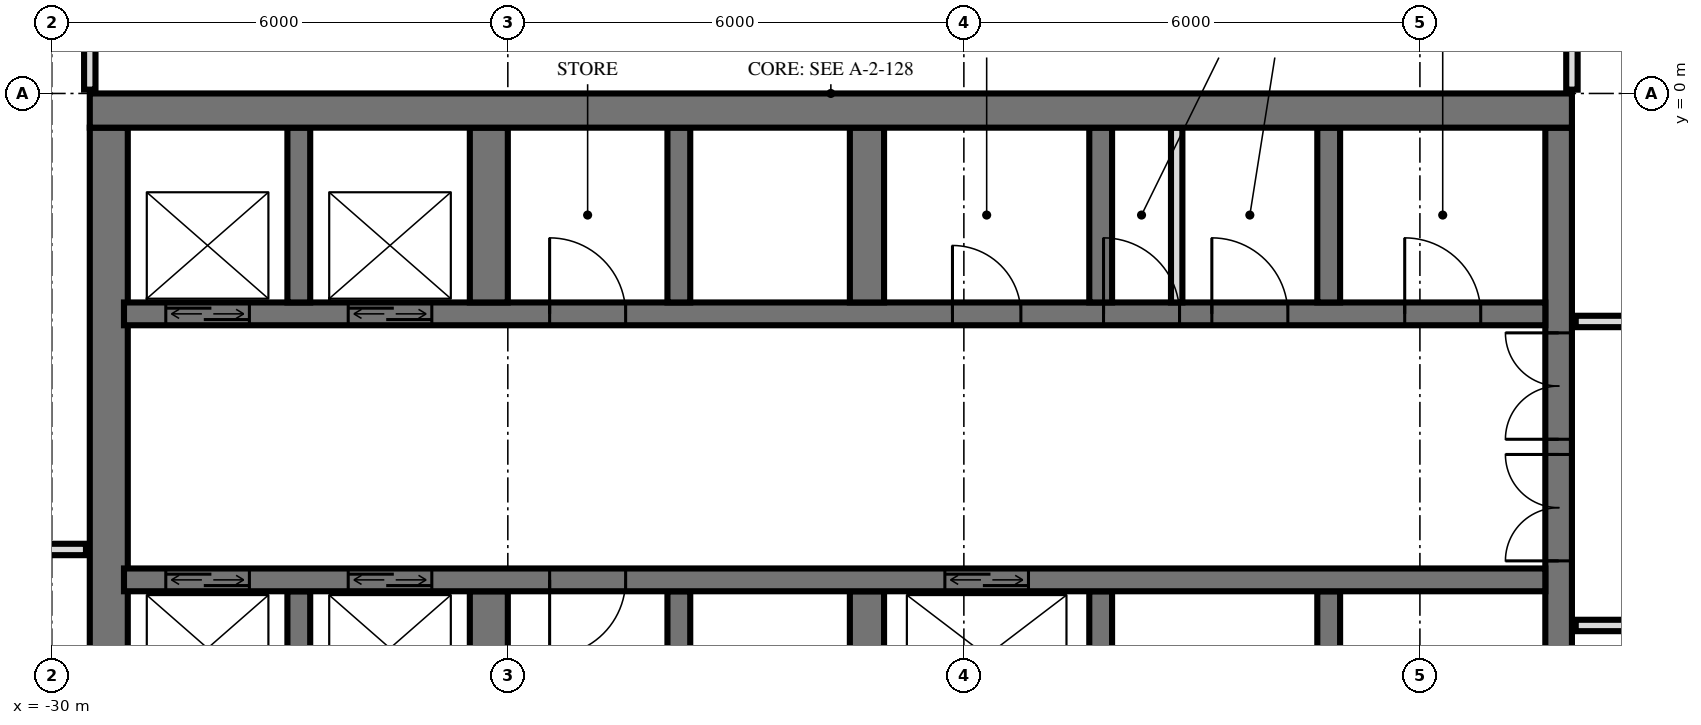
"""IFC4 building model, lengths in metres.
Left out: names, types, materials, properties, quantities, classifications, styles, units other than length and angle.
Written with IfcOpenShell. Run it as: python <this file> out.ifc"""

import sys

from ifc_helpers import new_model, si_unit, direction, frame, frame_2d, origin, place, context, subcontext, project, spatial, rectangle, extrude, element, fill, save


model = new_model("IFC4")
c1 = context("Model", 3, precision=1e-05, world=origin(), true_north=direction((0.0, 1.0)))
c2 = subcontext(c1, "Body", "Model", "MODEL_VIEW")
j1 = project(units=[si_unit("LENGTHUNIT", "METRE"), si_unit("PLANEANGLEUNIT", "RADIAN")], contexts=[c1])
p1 = place(None, origin())
s1 = spatial("IfcSite", under=j1, at=p1, CompositionType="ELEMENT")
p2 = place(p1, origin())
s2 = spatial("IfcBuilding", under=s1, at=p2, CompositionType="ELEMENT")
p3 = place(p2, frame((0.0, 0.0, 45.6)))
s3 = spatial("IfcBuildingStorey", under=s2, at=p3, CompositionType="ELEMENT", Elevation=45.6)
p4 = place(p3, frame((-29.5, -0.225, 0.0), z_axis=(0.0, 0.0, 1.0), x_axis=(1.0, 0.0, 0.0)))
e1 = element("IfcWall", 1, at=p4, inside=s3, PredefinedType="SHEAR", context=c2, shape_type="SweptSolid", body=[
    extrude(rectangle(XDim=19.5, YDim=0.45, at=frame_2d((9.75, 0.0))), origin(), (0.0, 0.0, 1.0), 3.6),
])
p5 = place(p3, frame((-10.175, -14.55, 0.0), z_axis=(0.0, 0.0, 1.0), x_axis=(0.0, 1.0, 0.0)))
e2 = element("IfcWall", 2, at=p5, inside=s3, PredefinedType="SHEAR", context=c2, shape_type="SweptSolid", body=[
    extrude(rectangle(XDim=14.1, YDim=0.35, at=frame_2d((7.05, 0.0))), origin(), (0.0, 0.0, 1.0), 3.6),
])
p6 = place(p5, frame((8.4, 0.0, 0.0)))
e3 = element("IfcOpeningElement", 3, at=p6, cuts=e2, PredefinedType="OPENING", context=c2, shape_type="SweptSolid", body=[
    extrude(rectangle(XDim=1.4, YDim=2.4, at=frame_2d((0.7, 1.2))), frame((0.0, 0.185, 0.0), z_axis=(0.0, -1.0, 0.0), x_axis=(1.0, 0.0, 0.0)), (0.0, 0.0, 1.0), 0.37),
])
p7 = place(p5, frame((10.0, 0.0, 0.0)))
e4 = element("IfcOpeningElement", 4, at=p7, cuts=e2, PredefinedType="OPENING", context=c2, shape_type="SweptSolid", body=[
    extrude(rectangle(XDim=1.4, YDim=2.4, at=frame_2d((0.7, 1.2))), frame((0.0, 0.185, 0.0), z_axis=(0.0, -1.0, 0.0), x_axis=(1.0, 0.0, 0.0)), (0.0, 0.0, 1.0), 0.37),
])
p8 = place(p5, frame((4.0, 0.0, 0.0)))
e5 = element("IfcOpeningElement", 5, at=p8, cuts=e2, PredefinedType="OPENING", context=c2, shape_type="SweptSolid", body=[
    extrude(rectangle(XDim=1.2, YDim=2.1, at=frame_2d((0.6, 1.05))), frame((0.0, 0.185, 0.0), z_axis=(0.0, -1.0, 0.0), x_axis=(1.0, 0.0, 0.0)), (0.0, 0.0, 1.0), 0.37),
])
p9 = place(p3, frame((-29.25, -14.55, 0.0), z_axis=(0.0, 0.0, 1.0), x_axis=(0.0, 1.0, 0.0)))
e6 = element("IfcWall", 6, at=p9, inside=s3, PredefinedType="SHEAR", context=c2, shape_type="SweptSolid", body=[
    extrude(rectangle(XDim=14.1, YDim=0.5, at=frame_2d((7.05, 0.0))), origin(), (0.0, 0.0, 1.0), 3.6),
])
p10 = place(p3, frame((-29.05, -2.9, 0.0), z_axis=(0.0, 0.0, 1.0), x_axis=(1.0, 0.0, 0.0)))
e7 = element("IfcWall", 7, at=p10, inside=s3, PredefinedType="SHEAR", context=c2, shape_type="SweptSolid", body=[
    extrude(rectangle(XDim=18.7, YDim=0.3, at=frame_2d((9.35, 0.0))), origin(), (0.0, 0.0, 1.0), 3.6),
])
p11 = place(p10, frame((2.95, 0.0, 0.0)))
e8 = element("IfcOpeningElement", 8, at=p11, cuts=e7, PredefinedType="OPENING", context=c2, shape_type="SweptSolid", body=[
    extrude(rectangle(XDim=1.1, YDim=2.1, at=frame_2d((0.55, 1.05))), frame((0.0, 0.16, 0.0), z_axis=(0.0, -1.0, 0.0), x_axis=(1.0, 0.0, 0.0)), (0.0, 0.0, 1.0), 0.32),
])
p12 = place(p10, frame((0.55, 0.0, 0.0)))
e9 = element("IfcOpeningElement", 9, at=p12, cuts=e7, PredefinedType="OPENING", context=c2, shape_type="SweptSolid", body=[
    extrude(rectangle(XDim=1.1, YDim=2.1, at=frame_2d((0.55, 1.05))), frame((0.0, 0.16, 0.0), z_axis=(0.0, -1.0, 0.0), x_axis=(1.0, 0.0, 0.0)), (0.0, 0.0, 1.0), 0.32),
])
p13 = place(p10, frame((10.9, 0.0, 0.0)))
e10 = element("IfcOpeningElement", 10, at=p13, cuts=e7, PredefinedType="OPENING", context=c2, shape_type="SweptSolid", body=[
    extrude(rectangle(XDim=0.9, YDim=2.1, at=frame_2d((0.45, 1.05))), frame((0.0, 0.16, 0.0), z_axis=(0.0, -1.0, 0.0), x_axis=(1.0, 0.0, 0.0)), (0.0, 0.0, 1.0), 0.32),
])
p14 = place(p10, frame((16.85, 0.0, 0.0)))
e11 = element("IfcOpeningElement", 11, at=p14, cuts=e7, PredefinedType="OPENING", context=c2, shape_type="SweptSolid", body=[
    extrude(rectangle(XDim=1.0, YDim=2.1, at=frame_2d((0.5, 1.05))), frame((0.0, 0.16, 0.0), z_axis=(0.0, -1.0, 0.0), x_axis=(1.0, 0.0, 0.0)), (0.0, 0.0, 1.0), 0.32),
])
p15 = place(p10, frame((14.312, 0.0, 0.0)))
e12 = element("IfcOpeningElement", 12, at=p15, cuts=e7, PredefinedType="OPENING", context=c2, shape_type="SweptSolid", body=[
    extrude(rectangle(XDim=1.0, YDim=2.1, at=frame_2d((0.5, 1.05))), frame((0.0, 0.16, 0.0), z_axis=(0.0, -1.0, 0.0), x_axis=(1.0, 0.0, 0.0)), (0.0, 0.0, 1.0), 0.32),
])
p16 = place(p10, frame((12.887, 0.0, 0.0)))
e13 = element("IfcOpeningElement", 13, at=p16, cuts=e7, PredefinedType="OPENING", context=c2, shape_type="SweptSolid", body=[
    extrude(rectangle(XDim=1.0, YDim=2.1, at=frame_2d((0.5, 1.05))), frame((0.0, 0.16, 0.0), z_axis=(0.0, -1.0, 0.0), x_axis=(1.0, 0.0, 0.0)), (0.0, 0.0, 1.0), 0.32),
])
p17 = place(p10, frame((5.6, 0.0, 0.0)))
e14 = element("IfcOpeningElement", 14, at=p17, cuts=e7, PredefinedType="OPENING", context=c2, shape_type="SweptSolid", body=[
    extrude(rectangle(XDim=1.0, YDim=2.1, at=frame_2d((0.5, 1.05))), frame((0.0, 0.16, 0.0), z_axis=(0.0, -1.0, 0.0), x_axis=(1.0, 0.0, 0.0)), (0.0, 0.0, 1.0), 0.32),
])
p18 = place(p3, frame((-29.05, -6.4, 0.0), z_axis=(0.0, 0.0, 1.0), x_axis=(1.0, 0.0, 0.0)))
e15 = element("IfcWall", 15, at=p18, inside=s3, PredefinedType="SHEAR", context=c2, shape_type="SweptSolid", body=[
    extrude(rectangle(XDim=18.7, YDim=0.3, at=frame_2d((9.35, 0.0))), origin(), (0.0, 0.0, 1.0), 3.6),
])
p19 = place(p18, frame((2.95, 0.0, 0.0)))
e16 = element("IfcOpeningElement", 16, at=p19, cuts=e15, PredefinedType="OPENING", context=c2, shape_type="SweptSolid", body=[
    extrude(rectangle(XDim=1.1, YDim=2.1, at=frame_2d((0.55, 1.05))), frame((0.0, 0.16, 0.0), z_axis=(0.0, -1.0, 0.0), x_axis=(1.0, 0.0, 0.0)), (0.0, 0.0, 1.0), 0.32),
])
p20 = place(p18, frame((0.55, 0.0, 0.0)))
e17 = element("IfcOpeningElement", 17, at=p20, cuts=e15, PredefinedType="OPENING", context=c2, shape_type="SweptSolid", body=[
    extrude(rectangle(XDim=1.1, YDim=2.1, at=frame_2d((0.55, 1.05))), frame((0.0, 0.16, 0.0), z_axis=(0.0, -1.0, 0.0), x_axis=(1.0, 0.0, 0.0)), (0.0, 0.0, 1.0), 0.32),
])
p21 = place(p18, frame((10.8, 0.0, 0.0)))
e18 = element("IfcOpeningElement", 18, at=p21, cuts=e15, PredefinedType="OPENING", context=c2, shape_type="SweptSolid", body=[
    extrude(rectangle(XDim=1.1, YDim=2.1, at=frame_2d((0.55, 1.05))), frame((0.0, 0.16, 0.0), z_axis=(0.0, -1.0, 0.0), x_axis=(1.0, 0.0, 0.0)), (0.0, 0.0, 1.0), 0.32),
])
p22 = place(p18, frame((5.6, 0.0, 0.0)))
e19 = element("IfcOpeningElement", 19, at=p22, cuts=e15, PredefinedType="OPENING", context=c2, shape_type="SweptSolid", body=[
    extrude(rectangle(XDim=1.0, YDim=2.1, at=frame_2d((0.5, 1.05))), frame((0.0, 0.16, 0.0), z_axis=(0.0, -1.0, 0.0), x_axis=(1.0, 0.0, 0.0)), (0.0, 0.0, 1.0), 0.32),
])
for number, where, z_axis, x_axis in (
    (20, (-13.2, -2.75, 0.0), (0.0, 0.0, 1.0), (0.0, 1.0, 0.0)),
    (21, (-13.2, -8.85, 0.0), (0.0, 0.0, 1.0), (0.0, 1.0, 0.0)),
    (22, (-16.2, -2.75, 0.0), (0.0, 0.0, 1.0), (0.0, 1.0, 0.0)),
    (23, (-16.2, -8.85, 0.0), (0.0, 0.0, 1.0), (0.0, 1.0, 0.0)),
):
    element("IfcWall", number, at=place(p3, frame(where, z_axis=z_axis, x_axis=x_axis)), inside=s3, PredefinedType="SHEAR", context=c2, shape_type="SweptSolid", body=[
        extrude(rectangle(XDim=2.3, YDim=0.3, at=frame_2d((1.15, 0.0))), origin(), (0.0, 0.0, 1.0), 3.6),
    ])
for number, where, z_axis, x_axis in (
    (24, (-19.275, -2.75, 0.0), (0.0, 0.0, 1.0), (0.0, 1.0, 0.0)),
    (25, (-19.275, -8.85, 0.0), (0.0, 0.0, 1.0), (0.0, 1.0, 0.0)),
):
    element("IfcWall", number, at=place(p3, frame(where, z_axis=z_axis, x_axis=x_axis)), inside=s3, PredefinedType="SHEAR", context=c2, shape_type="SweptSolid", body=[
        extrude(rectangle(XDim=2.3, YDim=0.45, at=frame_2d((1.15, 0.0))), origin(), (0.0, 0.0, 1.0), 3.6),
    ])
for number, where, z_axis, x_axis in (
    (26, (-21.75, -2.75, 0.0), (0.0, 0.0, 1.0), (0.0, 1.0, 0.0)),
    (27, (-21.75, -8.85, 0.0), (0.0, 0.0, 1.0), (0.0, 1.0, 0.0)),
):
    element("IfcWall", number, at=place(p3, frame(where, z_axis=z_axis, x_axis=x_axis)), inside=s3, PredefinedType="SHEAR", context=c2, shape_type="SweptSolid", body=[
        extrude(rectangle(XDim=2.3, YDim=0.3, at=frame_2d((1.15, 0.0))), origin(), (0.0, 0.0, 1.0), 3.6),
    ])
for number, where, z_axis, x_axis in (
    (28, (-24.25, -2.75, 0.0), (0.0, 0.0, 1.0), (0.0, 1.0, 0.0)),
    (29, (-24.25, -8.85, 0.0), (0.0, 0.0, 1.0), (0.0, 1.0, 0.0)),
):
    element("IfcWall", number, at=place(p3, frame(where, z_axis=z_axis, x_axis=x_axis)), inside=s3, PredefinedType="SHEAR", context=c2, shape_type="SweptSolid", body=[
        extrude(rectangle(XDim=2.3, YDim=0.5, at=frame_2d((1.15, 0.0))), origin(), (0.0, 0.0, 1.0), 3.6),
    ])
for number, where, z_axis, x_axis in (
    (30, (-26.75, -2.75, 0.0), (0.0, 0.0, 1.0), (0.0, 1.0, 0.0)),
    (31, (-26.75, -8.85, 0.0), (0.0, 0.0, 1.0), (0.0, 1.0, 0.0)),
):
    element("IfcWall", number, at=place(p3, frame(where, z_axis=z_axis, x_axis=x_axis)), inside=s3, PredefinedType="SHEAR", context=c2, shape_type="SweptSolid", body=[
        extrude(rectangle(XDim=2.3, YDim=0.3, at=frame_2d((1.15, 0.0))), origin(), (0.0, 0.0, 1.0), 3.6),
    ])
p23 = place(p3, frame((-15.2, -2.75, 0.0), z_axis=(0.0, 0.0, 1.0), x_axis=(0.0, 1.0, 0.0)))
e32 = element("IfcWall", 32, at=p23, inside=s3, PredefinedType="PARTITIONING", context=c2, shape_type="SweptSolid", body=[
    extrude(rectangle(XDim=2.3, YDim=0.15, at=frame_2d((1.15, 0.0))), origin(), (0.0, 0.0, 1.0), 3.3),
])
p24 = place(p3, frame((-10.0, 0.05, 0.0), z_axis=(0.0, 0.0, 1.0), x_axis=(0.0, 1.0, 0.0)))
e33 = element("IfcWall", 33, at=p24, inside=s3, PredefinedType="PARTITIONING", context=c2, shape_type="SweptSolid", body=[
    extrude(rectangle(XDim=0.97, YDim=0.15, at=frame_2d((0.485, 0.0))), origin(), (0.0, 0.0, 1.0), 3.32),
])
p25 = place(p3, frame((-29.5, 0.05, 0.0), z_axis=(0.0, 0.0, 1.0), x_axis=(0.0, 1.0, 0.0)))
e34 = element("IfcWall", 34, at=p25, inside=s3, PredefinedType="PARTITIONING", context=c2, shape_type="SweptSolid", body=[
    extrude(rectangle(XDim=0.827, YDim=0.15, at=frame_2d((0.414, 0.0))), origin(), (0.0, 0.0, 1.0), 3.32),
])
p26 = place(p3, frame((-9.95, -7.0, 0.0), z_axis=(0.0, 0.0, 1.0), x_axis=(1.0, 0.0, 0.0)))
e35 = element("IfcWall", 35, at=p26, inside=s3, PredefinedType="PARTITIONING", context=c2, shape_type="SweptSolid", body=[
    extrude(rectangle(XDim=19.9, YDim=0.15, at=frame_2d((9.95, 0.0))), origin(), (0.0, 0.0, 1.0), 3.32),
])
p27 = place(p26, frame((9.45, 0.0, 0.0)))
e36 = element("IfcOpeningElement", 36, at=p27, cuts=e35, PredefinedType="OPENING", context=c2, shape_type="SweptSolid", body=[
    extrude(rectangle(XDim=1.0, YDim=2.1, at=frame_2d((0.5, 1.05))), frame((0.0, 0.085, 0.0), z_axis=(0.0, -1.0, 0.0), x_axis=(1.0, 0.0, 0.0)), (0.0, 0.0, 1.0), 0.17),
])
p28 = place(p26, frame((3.45, 0.0, 0.0)))
e37 = element("IfcOpeningElement", 37, at=p28, cuts=e35, PredefinedType="OPENING", context=c2, shape_type="SweptSolid", body=[
    extrude(rectangle(XDim=1.0, YDim=2.1, at=frame_2d((0.5, 1.05))), frame((0.0, 0.085, 0.0), z_axis=(0.0, -1.0, 0.0), x_axis=(1.0, 0.0, 0.0)), (0.0, 0.0, 1.0), 0.17),
])
p29 = place(p3, frame((-33.12, -6.0, 0.0), z_axis=(0.0, 0.0, 1.0), x_axis=(1.0, 0.0, 0.0)))
e38 = element("IfcWall", 38, at=p29, inside=s3, PredefinedType="PLUMBINGWALL", context=c2, shape_type="SweptSolid", body=[
    extrude(rectangle(XDim=3.57, YDim=0.15, at=frame_2d((1.785, 0.0))), origin(), (0.0, 0.0, 1.0), 3.32),
])
p30 = place(p29, frame((1.27, 0.0, 0.0)))
e39 = element("IfcOpeningElement", 39, at=p30, cuts=e38, PredefinedType="OPENING", context=c2, shape_type="SweptSolid", body=[
    extrude(rectangle(XDim=0.9, YDim=2.1, at=frame_2d((0.45, 1.05))), frame((0.0, 0.085, 0.0), z_axis=(0.0, -1.0, 0.0), x_axis=(1.0, 0.0, 0.0)), (0.0, 0.0, 1.0), 0.17),
])
p31 = place(p3, frame((-9.95, -3.0, 0.0), z_axis=(0.0, 0.0, 1.0), x_axis=(1.0, 0.0, 0.0)))
e40 = element("IfcWall", 40, at=p31, inside=s3, PredefinedType="PARTITIONING", context=c2, shape_type="SweptSolid", body=[
    extrude(rectangle(XDim=19.9, YDim=0.15, at=frame_2d((9.95, 0.0))), origin(), (0.0, 0.0, 1.0), 3.32),
])
p32 = place(p31, frame((4.2, 0.0, 0.0)))
e41 = element("IfcOpeningElement", 41, at=p32, cuts=e40, PredefinedType="OPENING", context=c2, shape_type="SweptSolid", body=[
    extrude(rectangle(XDim=1.0, YDim=2.1, at=frame_2d((0.5, 1.05))), frame((0.0, 0.085, 0.0), z_axis=(0.0, -1.0, 0.0), x_axis=(1.0, 0.0, 0.0)), (0.0, 0.0, 1.0), 0.17),
])
p33 = place(p31, frame((11.45, 0.0, 0.0)))
e42 = element("IfcOpeningElement", 42, at=p33, cuts=e40, PredefinedType="OPENING", context=c2, shape_type="SweptSolid", body=[
    extrude(rectangle(XDim=1.0, YDim=2.1, at=frame_2d((0.5, 1.05))), frame((0.0, 0.085, 0.0), z_axis=(0.0, -1.0, 0.0), x_axis=(1.0, 0.0, 0.0)), (0.0, 0.0, 1.0), 0.17),
])
p34 = place(p31, frame((15.45, 0.0, 0.0)))
e43 = element("IfcOpeningElement", 43, at=p34, cuts=e40, PredefinedType="OPENING", context=c2, shape_type="SweptSolid", body=[
    extrude(rectangle(XDim=1.0, YDim=2.1, at=frame_2d((0.5, 1.05))), frame((0.0, 0.085, 0.0), z_axis=(0.0, -1.0, 0.0), x_axis=(1.0, 0.0, 0.0)), (0.0, 0.0, 1.0), 0.17),
])
p35 = place(p31, frame((18.2, 0.0, 0.0)))
e44 = element("IfcOpeningElement", 44, at=p35, cuts=e40, PredefinedType="OPENING", context=c2, shape_type="SweptSolid", body=[
    extrude(rectangle(XDim=1.0, YDim=2.1, at=frame_2d((0.5, 1.05))), frame((0.0, 0.085, 0.0), z_axis=(0.0, -1.0, 0.0), x_axis=(1.0, 0.0, 0.0)), (0.0, 0.0, 1.0), 0.17),
])
p36 = place(p11, origin())
e45 = element("IfcDoor", 45, at=p36, inside=s3, OperationType="DOUBLE_DOOR_SLIDING", PredefinedType="USERDEFINED", context=c2, shape_type="SweptSolid", body=[
    extrude(rectangle(XDim=1.1, YDim=2.1, at=frame_2d((0.55, 1.05))), frame((0.0, 0.025, 0.0), z_axis=(0.0, -1.0, 0.0), x_axis=(1.0, 0.0, 0.0)), (0.0, 0.0, 1.0), 0.05),
])
fill(e8, e45)
p37 = place(p12, origin())
e46 = element("IfcDoor", 46, at=p37, inside=s3, OperationType="DOUBLE_DOOR_SLIDING", PredefinedType="USERDEFINED", context=c2, shape_type="SweptSolid", body=[
    extrude(rectangle(XDim=1.1, YDim=2.1, at=frame_2d((0.55, 1.05))), frame((0.0, 0.025, 0.0), z_axis=(0.0, -1.0, 0.0), x_axis=(1.0, 0.0, 0.0)), (0.0, 0.0, 1.0), 0.05),
])
fill(e9, e46)
p38 = place(p19, origin())
e47 = element("IfcDoor", 47, at=p38, inside=s3, OperationType="DOUBLE_DOOR_SLIDING", PredefinedType="USERDEFINED", context=c2, shape_type="SweptSolid", body=[
    extrude(rectangle(XDim=1.1, YDim=2.1, at=frame_2d((0.55, 1.05))), frame((0.0, 0.025, 0.0), z_axis=(0.0, -1.0, 0.0), x_axis=(1.0, 0.0, 0.0)), (0.0, 0.0, 1.0), 0.05),
])
fill(e16, e47)
p39 = place(p20, origin())
e48 = element("IfcDoor", 48, at=p39, inside=s3, OperationType="DOUBLE_DOOR_SLIDING", PredefinedType="USERDEFINED", context=c2, shape_type="SweptSolid", body=[
    extrude(rectangle(XDim=1.1, YDim=2.1, at=frame_2d((0.55, 1.05))), frame((0.0, 0.025, 0.0), z_axis=(0.0, -1.0, 0.0), x_axis=(1.0, 0.0, 0.0)), (0.0, 0.0, 1.0), 0.05),
])
fill(e17, e48)
p40 = place(p21, origin())
e49 = element("IfcDoor", 49, at=p40, inside=s3, OperationType="DOUBLE_DOOR_SLIDING", PredefinedType="USERDEFINED", context=c2, shape_type="SweptSolid", body=[
    extrude(rectangle(XDim=1.1, YDim=2.1, at=frame_2d((0.55, 1.05))), frame((0.0, 0.025, 0.0), z_axis=(0.0, -1.0, 0.0), x_axis=(1.0, 0.0, 0.0)), (0.0, 0.0, 1.0), 0.05),
])
fill(e18, e49)
p41 = place(p6, origin())
e50 = element("IfcDoor", 50, at=p41, inside=s3, OperationType="DOUBLE_DOOR_SINGLE_SWING", PredefinedType="DOOR", context=c2, shape_type="SweptSolid", body=[
    extrude(rectangle(XDim=1.4, YDim=2.4, at=frame_2d((0.7, 1.2))), frame((0.0, 0.025, 0.0), z_axis=(0.0, -1.0, 0.0), x_axis=(1.0, 0.0, 0.0)), (0.0, 0.0, 1.0), 0.05),
])
fill(e3, e50)
p42 = place(p7, origin())
e51 = element("IfcDoor", 51, at=p42, inside=s3, OperationType="DOUBLE_DOOR_SINGLE_SWING", PredefinedType="DOOR", context=c2, shape_type="SweptSolid", body=[
    extrude(rectangle(XDim=1.4, YDim=2.4, at=frame_2d((0.7, 1.2))), frame((0.0, 0.025, 0.0), z_axis=(0.0, -1.0, 0.0), x_axis=(1.0, 0.0, 0.0)), (0.0, 0.0, 1.0), 0.05),
])
fill(e4, e51)
p43 = place(p13, origin())
e52 = element("IfcDoor", 52, at=p43, inside=s3, OperationType="SINGLE_SWING_RIGHT", PredefinedType="DOOR", context=c2, shape_type="SweptSolid", body=[
    extrude(rectangle(XDim=0.9, YDim=2.1, at=frame_2d((0.45, 1.05))), frame((0.0, 0.025, 0.0), z_axis=(0.0, -1.0, 0.0), x_axis=(1.0, 0.0, 0.0)), (0.0, 0.0, 1.0), 0.05),
])
fill(e10, e52)
p44 = place(p14, origin())
e53 = element("IfcDoor", 53, at=p44, inside=s3, OperationType="SINGLE_SWING_RIGHT", PredefinedType="DOOR", context=c2, shape_type="SweptSolid", body=[
    extrude(rectangle(XDim=1.0, YDim=2.1, at=frame_2d((0.5, 1.05))), frame((0.0, 0.025, 0.0), z_axis=(0.0, -1.0, 0.0), x_axis=(1.0, 0.0, 0.0)), (0.0, 0.0, 1.0), 0.05),
])
fill(e11, e53)
p45 = place(p15, origin())
e54 = element("IfcDoor", 54, at=p45, inside=s3, OperationType="SINGLE_SWING_RIGHT", PredefinedType="DOOR", context=c2, shape_type="SweptSolid", body=[
    extrude(rectangle(XDim=1.0, YDim=2.1, at=frame_2d((0.5, 1.05))), frame((0.0, 0.025, 0.0), z_axis=(0.0, -1.0, 0.0), x_axis=(1.0, 0.0, 0.0)), (0.0, 0.0, 1.0), 0.05),
])
fill(e12, e54)
p46 = place(p16, origin())
e55 = element("IfcDoor", 55, at=p46, inside=s3, OperationType="SINGLE_SWING_RIGHT", PredefinedType="DOOR", context=c2, shape_type="SweptSolid", body=[
    extrude(rectangle(XDim=1.0, YDim=2.1, at=frame_2d((0.5, 1.05))), frame((0.0, 0.025, 0.0), z_axis=(0.0, -1.0, 0.0), x_axis=(1.0, 0.0, 0.0)), (0.0, 0.0, 1.0), 0.05),
])
fill(e13, e55)
p47 = place(p17, origin())
e56 = element("IfcDoor", 56, at=p47, inside=s3, OperationType="SINGLE_SWING_RIGHT", PredefinedType="DOOR", context=c2, shape_type="SweptSolid", body=[
    extrude(rectangle(XDim=1.0, YDim=2.1, at=frame_2d((0.5, 1.05))), frame((0.0, 0.025, 0.0), z_axis=(0.0, -1.0, 0.0), x_axis=(1.0, 0.0, 0.0)), (0.0, 0.0, 1.0), 0.05),
])
fill(e14, e56)
p48 = place(p22, frame((0.5, 0.0, 0.0), z_axis=(0.0, 0.0, 1.0), x_axis=(-1.0, 0.0, 0.0)))
e57 = element("IfcDoor", 57, at=p48, inside=s3, OperationType="SINGLE_SWING_LEFT", PredefinedType="DOOR", context=c2, shape_type="SweptSolid", body=[
    extrude(rectangle(XDim=1.0, YDim=2.1, at=frame_2d((0.0, 1.05))), frame((0.0, -0.025, 0.0), z_axis=(0.0, 1.0, 0.0), x_axis=(-1.0, 0.0, 0.0)), (0.0, 0.0, 1.0), 0.05),
])
fill(e19, e57)
save(model, sys.argv[1])
